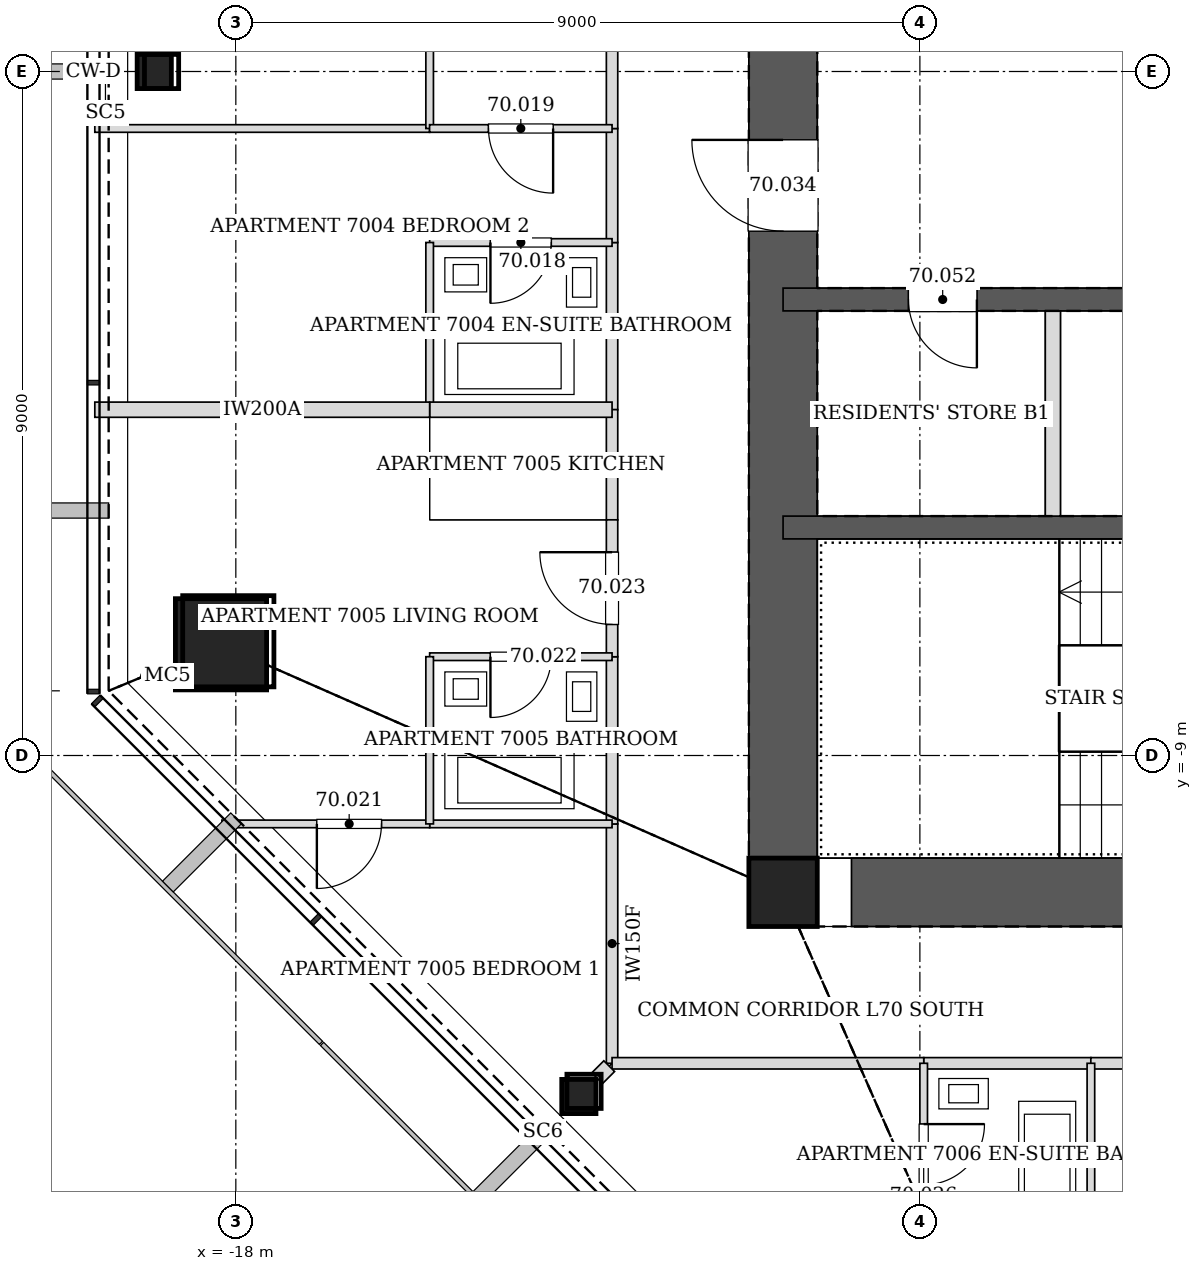
"""IFC4 building model, lengths in metres.
Left out: names, types, materials, properties, quantities, classifications, styles, units other than length and angle.
Written with IfcOpenShell. Run it as: python <this file> out.ifc"""

import sys

from ifc_helpers import new_model, si_unit, direction, frame, frame_2d, origin, origin_2d, place, context, subcontext, project, spatial, rectangle, hollow_rectangle, extrude, element, fill, save


model = new_model("IFC4")
c1 = context("Model", 3, precision=1e-05, world=origin(), true_north=direction((0.0, 1.0)))
c2 = subcontext(c1, "Body", "Model", "MODEL_VIEW")
j1 = project(units=[si_unit("LENGTHUNIT", "METRE"), si_unit("PLANEANGLEUNIT", "RADIAN")], contexts=[c1])
p1 = place(None, origin())
s1 = spatial("IfcSite", under=j1, at=p1, CompositionType="ELEMENT")
p2 = place(p1, origin())
s2 = spatial("IfcBuilding", under=s1, at=p2, CompositionType="ELEMENT")
p3 = place(p2, frame((0.0, 0.0, 287.8)))
s3 = spatial("IfcBuildingStorey", under=s2, at=p3, CompositionType="ELEMENT", Elevation=287.8)
p4 = place(p3, frame((-18.195, -7.537, 0.0), z_axis=(0.02827915051, 0.01169924247, 0.999531598986), x_axis=(-0.382282742426, 0.924045401938, 0.0)))
e1 = element("IfcColumn", 1, at=p4, inside=s3, PredefinedType="COLUMN", context=c2, shape_type="SweptSolid", body=[
    extrude(hollow_rectangle(XDim=1.2, YDim=1.2, WallThickness=0.055, at=origin_2d()), origin(), (0.0, 0.0, 1.0), 3.402),
])
for number, where, z_axis, x_axis in (
    (2, (-19.073, 0.0, 0.0), (0.028, 0.0, 1.0), (0.0, 1.0, 0.0)),
    (3, (-13.487, -13.487, 0.0), (0.02, 0.02, 1.0), (-0.707, 0.707, 0.0)),
):
    element("IfcColumn", number, at=place(p3, frame(where, z_axis=z_axis, x_axis=x_axis)), inside=s3, PredefinedType="COLUMN", context=c2, shape_type="SweptSolid", body=[
        extrude(hollow_rectangle(XDim=0.45, YDim=0.45, WallThickness=0.02, at=origin_2d()), origin(), (0.0, 0.0, 1.0), 3.401),
    ])
p5 = place(p3, frame((-10.8, -10.8, 0.0), z_axis=(0.0, 0.0, 1.0), x_axis=(1.0, 0.0, 0.0)))
e4 = element("IfcColumn", 4, at=p5, inside=s3, PredefinedType="COLUMN", context=c2, shape_type="SweptSolid", body=[
    extrude(hollow_rectangle(XDim=0.9, YDim=0.9, WallThickness=0.04, at=origin_2d()), origin(), (0.0, 0.0, 1.0), 3.4),
])
p6 = place(p3, frame((-10.8, -10.8, 0.0), z_axis=(0.0, 0.0, 1.0), x_axis=(1.0, 0.0, 0.0)))
e5 = element("IfcWall", 5, at=p6, inside=s3, PredefinedType="SOLIDWALL", context=c2, shape_type="SweptSolid", body=[
    extrude(rectangle(XDim=21.6, YDim=0.9, at=frame_2d((10.8, 0.0))), origin(), (0.0, 0.0, 1.0), 3.4),
])
p7 = place(p6, frame((10.05, 0.0, 0.0)))
e6 = element("IfcOpeningElement", 6, at=p7, cuts=e5, PredefinedType="OPENING", context=c2, shape_type="SweptSolid", body=[
    extrude(rectangle(XDim=1.5, YDim=2.1, at=frame_2d((0.75, 1.05))), frame((0.0, 0.46, 0.0), z_axis=(0.0, -1.0, 0.0), x_axis=(1.0, 0.0, 0.0)), (0.0, 0.0, 1.0), 0.92),
])
p8 = place(p6, frame((17.1, 0.0, 0.0)))
e7 = element("IfcOpeningElement", 7, at=p8, cuts=e5, PredefinedType="OPENING", context=c2, shape_type="SweptSolid", body=[
    extrude(rectangle(XDim=0.9, YDim=2.1, at=frame_2d((0.45, 1.05))), frame((0.0, 0.46, 0.0), z_axis=(0.0, -1.0, 0.0), x_axis=(1.0, 0.0, 0.0)), (0.0, 0.0, 1.0), 0.92),
])
p9 = place(p3, frame((-10.8, 10.8, 0.0), z_axis=(0.0, 0.0, 1.0), x_axis=(0.0, -1.0, 0.0)))
e8 = element("IfcWall", 8, at=p9, inside=s3, PredefinedType="SOLIDWALL", context=c2, shape_type="SweptSolid", body=[
    extrude(rectangle(XDim=21.6, YDim=0.9, at=frame_2d((10.8, 0.0))), origin(), (0.0, 0.0, 1.0), 3.4),
])
p10 = place(p9, frame((8.7, 0.0, 0.0)))
e9 = element("IfcOpeningElement", 9, at=p10, cuts=e8, PredefinedType="OPENING", context=c2, shape_type="SweptSolid", body=[
    extrude(rectangle(XDim=1.2, YDim=2.1, at=frame_2d((0.6, 1.05))), frame((0.0, 0.46, 0.0), z_axis=(0.0, -1.0, 0.0), x_axis=(1.0, 0.0, 0.0)), (0.0, 0.0, 1.0), 0.92),
])
p11 = place(p9, frame((11.7, 0.0, 0.0)))
e10 = element("IfcOpeningElement", 10, at=p11, cuts=e8, PredefinedType="OPENING", context=c2, shape_type="SweptSolid", body=[
    extrude(rectangle(XDim=1.2, YDim=2.1, at=frame_2d((0.6, 1.05))), frame((0.0, 0.46, 0.0), z_axis=(0.0, -1.0, 0.0), x_axis=(1.0, 0.0, 0.0)), (0.0, 0.0, 1.0), 0.92),
])
p12 = place(p3, frame((-10.8, -3.0, 0.0), z_axis=(0.0, 0.0, 1.0), x_axis=(1.0, 0.0, 0.0)))
e11 = element("IfcWall", 11, at=p12, inside=s3, PredefinedType="SOLIDWALL", context=c2, shape_type="SweptSolid", body=[
    extrude(rectangle(XDim=21.6, YDim=0.3, at=frame_2d((10.8, 0.0))), origin(), (0.0, 0.0, 1.0), 3.4),
])
p13 = place(p12, frame((4.55, 0.0, 0.0)))
e12 = element("IfcOpeningElement", 12, at=p13, cuts=e11, PredefinedType="OPENING", context=c2, shape_type="SweptSolid", body=[
    extrude(rectangle(XDim=0.9, YDim=2.1, at=frame_2d((0.45, 1.05))), frame((0.0, 0.16, 0.0), z_axis=(0.0, -1.0, 0.0), x_axis=(1.0, 0.0, 0.0)), (0.0, 0.0, 1.0), 0.32),
])
p14 = place(p12, frame((7.45, 0.0, 0.0)))
e13 = element("IfcOpeningElement", 13, at=p14, cuts=e11, PredefinedType="OPENING", context=c2, shape_type="SweptSolid", body=[
    extrude(rectangle(XDim=0.9, YDim=2.1, at=frame_2d((0.45, 1.05))), frame((0.0, 0.16, 0.0), z_axis=(0.0, -1.0, 0.0), x_axis=(1.0, 0.0, 0.0)), (0.0, 0.0, 1.0), 0.32),
])
p15 = place(p12, frame((1.65, 0.0, 0.0)))
e14 = element("IfcOpeningElement", 14, at=p15, cuts=e11, PredefinedType="OPENING", context=c2, shape_type="SweptSolid", body=[
    extrude(rectangle(XDim=0.9, YDim=2.1, at=frame_2d((0.45, 1.05))), frame((0.0, 0.16, 0.0), z_axis=(0.0, -1.0, 0.0), x_axis=(1.0, 0.0, 0.0)), (0.0, 0.0, 1.0), 0.32),
])
p16 = place(p12, frame((13.25, 0.0, 0.0)))
e15 = element("IfcOpeningElement", 15, at=p16, cuts=e11, PredefinedType="OPENING", context=c2, shape_type="SweptSolid", body=[
    extrude(rectangle(XDim=0.9, YDim=2.1, at=frame_2d((0.45, 1.05))), frame((0.0, 0.16, 0.0), z_axis=(0.0, -1.0, 0.0), x_axis=(1.0, 0.0, 0.0)), (0.0, 0.0, 1.0), 0.32),
])
p17 = place(p12, frame((16.05, 0.0, 0.0)))
e16 = element("IfcOpeningElement", 16, at=p17, cuts=e11, PredefinedType="OPENING", context=c2, shape_type="SweptSolid", body=[
    extrude(rectangle(XDim=1.1, YDim=2.1, at=frame_2d((0.55, 1.05))), frame((0.0, 0.16, 0.0), z_axis=(0.0, -1.0, 0.0), x_axis=(1.0, 0.0, 0.0)), (0.0, 0.0, 1.0), 0.32),
])
p18 = place(p12, frame((18.95, 0.0, 0.0)))
e17 = element("IfcOpeningElement", 17, at=p18, cuts=e11, PredefinedType="OPENING", context=c2, shape_type="SweptSolid", body=[
    extrude(rectangle(XDim=1.1, YDim=2.1, at=frame_2d((0.55, 1.05))), frame((0.0, 0.16, 0.0), z_axis=(0.0, -1.0, 0.0), x_axis=(1.0, 0.0, 0.0)), (0.0, 0.0, 1.0), 0.32),
])
p19 = place(p3, frame((-10.8, -6.0, 0.0), z_axis=(0.0, 0.0, 1.0), x_axis=(1.0, 0.0, 0.0)))
e18 = element("IfcWall", 18, at=p19, inside=s3, PredefinedType="SOLIDWALL", context=c2, shape_type="SweptSolid", body=[
    extrude(rectangle(XDim=21.6, YDim=0.3, at=frame_2d((10.8, 0.0))), origin(), (0.0, 0.0, 1.0), 3.4),
])
p20 = place(p19, frame((10.25, 0.0, 0.0)))
e19 = element("IfcOpeningElement", 19, at=p20, cuts=e18, PredefinedType="OPENING", context=c2, shape_type="SweptSolid", body=[
    extrude(rectangle(XDim=1.1, YDim=2.1, at=frame_2d((0.55, 1.05))), frame((0.0, 0.16, 0.0), z_axis=(0.0, -1.0, 0.0), x_axis=(1.0, 0.0, 0.0)), (0.0, 0.0, 1.0), 0.32),
])
p21 = place(p3, frame((-13.05, -2.249, 0.0), z_axis=(0.0, 0.0, 1.0), x_axis=(0.0, -1.0, 0.0)))
e20 = element("IfcWall", 20, at=p21, inside=s3, PredefinedType="PARTITIONING", context=c2, shape_type="SweptSolid", body=[
    extrude(rectangle(XDim=2.202, YDim=0.15, at=frame_2d((1.101, 0.0))), origin(), (0.0, 0.0, 1.0), 3.2),
])
p22 = place(p3, frame((-13.05, -0.749, 0.0), z_axis=(0.0, 0.0, 1.0), x_axis=(0.0, -1.0, 0.0)))
e21 = element("IfcWall", 21, at=p22, inside=s3, PredefinedType="PARTITIONING", context=c2, shape_type="SweptSolid", body=[
    extrude(rectangle(XDim=1.502, YDim=0.15, at=frame_2d((0.751, 0.0))), origin(), (0.0, 0.0, 1.0), 3.2),
])
p23 = place(p3, frame((-13.05, 2.5, 0.0), z_axis=(0.0, 0.0, 1.0), x_axis=(0.0, -1.0, 0.0)))
e22 = element("IfcWall", 22, at=p23, inside=s3, PredefinedType="PARTITIONING", context=c2, shape_type="SweptSolid", body=[
    extrude(rectangle(XDim=3.251, YDim=0.15, at=frame_2d((1.625, 0.0))), origin(), (0.0, 0.0, 1.0), 2.349),
])
p24 = place(p23, frame((1.15, 0.0, 0.0)))
e23 = element("IfcOpeningElement", 23, at=p24, cuts=e22, PredefinedType="OPENING", context=c2, shape_type="SweptSolid", body=[
    extrude(rectangle(XDim=0.95, YDim=2.1, at=frame_2d((0.475, 1.05))), frame((0.0, 0.085, 0.0), z_axis=(0.0, -1.0, 0.0), x_axis=(1.0, 0.0, 0.0)), (0.0, 0.0, 1.0), 0.17),
])
p25 = place(p3, frame((-13.05, -9.899, 0.0), z_axis=(0.0, 0.0, 1.0), x_axis=(0.0, -1.0, 0.0)))
e24 = element("IfcWall", 24, at=p25, inside=s3, PredefinedType="PARTITIONING", context=c2, shape_type="SweptSolid", body=[
    extrude(rectangle(XDim=3.151, YDim=0.15, at=frame_2d((1.576, 0.0))), origin(), (0.0, 0.0, 1.0), 2.497),
])
p26 = place(p3, frame((-13.05, -7.699, 0.0), z_axis=(0.0, 0.0, 1.0), x_axis=(0.0, -1.0, 0.0)))
e25 = element("IfcWall", 25, at=p26, inside=s3, PredefinedType="PARTITIONING", context=c2, shape_type="SweptSolid", body=[
    extrude(rectangle(XDim=2.202, YDim=0.15, at=frame_2d((1.101, 0.0))), origin(), (0.0, 0.0, 1.0), 2.497),
])
p27 = place(p3, frame((-13.05, -4.449, 0.0), z_axis=(0.0, 0.0, 1.0), x_axis=(0.0, -1.0, 0.0)))
e26 = element("IfcWall", 26, at=p27, inside=s3, PredefinedType="PARTITIONING", context=c2, shape_type="SweptSolid", body=[
    extrude(rectangle(XDim=1.452, YDim=0.15, at=frame_2d((0.726, 0.0))), origin(), (0.0, 0.0, 1.0), 3.2),
])
p28 = place(p3, frame((-13.05, -5.899, 0.0), z_axis=(0.0, 0.0, 1.0), x_axis=(0.0, -1.0, 0.0)))
e27 = element("IfcWall", 27, at=p28, inside=s3, PredefinedType="PARTITIONING", context=c2, shape_type="SweptSolid", body=[
    extrude(rectangle(XDim=1.802, YDim=0.15, at=frame_2d((0.901, 0.0))), origin(), (0.0, 0.0, 1.0), 3.2),
])
p29 = place(p28, frame((0.426, 0.0, 0.0)))
e28 = element("IfcOpeningElement", 28, at=p29, cuts=e27, PredefinedType="OPENING", context=c2, shape_type="SweptSolid", body=[
    extrude(rectangle(XDim=0.95, YDim=2.1, at=frame_2d((0.475, 1.05))), frame((0.0, 0.085, 0.0), z_axis=(0.0, -1.0, 0.0), x_axis=(1.0, 0.0, 0.0)), (0.0, 0.0, 1.0), 0.17),
])
p30 = place(p3, frame((-8.951, -13.05, 0.0), z_axis=(0.0, 0.0, 1.0), x_axis=(1.0, 0.0, 0.0)))
e29 = element("IfcWall", 29, at=p30, inside=s3, PredefinedType="PARTITIONING", context=c2, shape_type="SweptSolid", body=[
    extrude(rectangle(XDim=2.202, YDim=0.15, at=frame_2d((1.101, 0.0))), origin(), (0.0, 0.0, 1.0), 3.2),
])
p31 = place(p3, frame((-13.05, -13.05, 0.0), z_axis=(0.0, 0.0, 1.0), x_axis=(1.0, 0.0, 0.0)))
e30 = element("IfcWall", 30, at=p31, inside=s3, PredefinedType="PARTITIONING", context=c2, shape_type="SweptSolid", body=[
    extrude(rectangle(XDim=4.101, YDim=0.15, at=frame_2d((2.051, 0.0))), origin(), (0.0, 0.0, 1.0), 2.497),
])
p32 = place(p3, frame((-6.751, -13.05, 0.0), z_axis=(0.0, 0.0, 1.0), x_axis=(1.0, 0.0, 0.0)))
e31 = element("IfcWall", 31, at=p32, inside=s3, PredefinedType="PARTITIONING", context=c2, shape_type="SweptSolid", body=[
    extrude(rectangle(XDim=9.802, YDim=0.15, at=frame_2d((4.901, 0.0))), origin(), (0.0, 0.0, 1.0), 2.349),
])
p33 = place(p3, frame((-19.855, -0.75, 0.0), z_axis=(0.0, 0.0, 1.0), x_axis=(1.0, 0.0, 0.0)))
e32 = element("IfcWall", 32, at=p33, inside=s3, PredefinedType="PARTITIONING", context=c2, shape_type="SweptSolid", body=[
    extrude(rectangle(XDim=4.405, YDim=0.1, at=frame_2d((2.203, 0.0))), origin(), (0.0, 0.0, 1.0), 2.73),
])
p34 = place(p3, frame((-15.45, -0.75, 0.0), z_axis=(0.0, 0.0, 1.0), x_axis=(0.0, 1.0, 0.0)))
e33 = element("IfcWall", 33, at=p34, inside=s3, PredefinedType="PARTITIONING", context=c2, shape_type="SweptSolid", body=[
    extrude(rectangle(XDim=3.4, YDim=0.1, at=frame_2d((1.7, 0.0))), origin(), (0.0, 0.0, 1.0), 2.349),
])
p35 = place(p3, frame((-13.05, -2.25, 0.0), z_axis=(0.0, 0.0, 1.0), x_axis=(-1.0, 0.0, 0.0)))
e34 = element("IfcWall", 34, at=p35, inside=s3, PredefinedType="PARTITIONING", context=c2, shape_type="SweptSolid", body=[
    extrude(rectangle(XDim=2.4, YDim=0.1, at=frame_2d((1.2, 0.0))), origin(), (0.0, 0.0, 1.0), 2.591),
])
p36 = place(p35, frame((0.8, 0.0, 0.0)))
e35 = element("IfcOpeningElement", 35, at=p36, cuts=e34, PredefinedType="OPENING", context=c2, shape_type="SweptSolid", body=[
    extrude(rectangle(XDim=0.8, YDim=2.1, at=frame_2d((0.4, 1.05))), frame((0.0, 0.06, 0.0), z_axis=(0.0, -1.0, 0.0), x_axis=(1.0, 0.0, 0.0)), (0.0, 0.0, 1.0), 0.12),
])
p37 = place(p3, frame((-15.45, -2.25, 0.0), z_axis=(0.0, 0.0, 1.0), x_axis=(0.0, -1.0, 0.0)))
e36 = element("IfcWall", 36, at=p37, inside=s3, PredefinedType="PARTITIONING", context=c2, shape_type="SweptSolid", body=[
    extrude(rectangle(XDim=2.2, YDim=0.1, at=frame_2d((1.1, 0.0))), origin(), (0.0, 0.0, 1.0), 3.2),
])
p38 = place(p3, frame((-15.45, -4.45, 0.0), z_axis=(0.0, 0.0, 1.0), x_axis=(1.0, 0.0, 0.0)))
e37 = element("IfcWall", 37, at=p38, inside=s3, PredefinedType="PARTITIONING", context=c2, shape_type="SweptSolid", body=[
    extrude(rectangle(XDim=2.4, YDim=0.2, at=frame_2d((1.2, 0.0))), origin(), (0.0, 0.0, 1.0), 2.591),
])
p39 = place(p3, frame((-13.05, -0.75, 0.0), z_axis=(0.0, 0.0, 1.0), x_axis=(-1.0, 0.0, 0.0)))
e38 = element("IfcWall", 38, at=p39, inside=s3, PredefinedType="PARTITIONING", context=c2, shape_type="SweptSolid", body=[
    extrude(rectangle(XDim=2.401, YDim=0.1, at=frame_2d((1.2, 0.0))), origin(), (0.0, 0.0, 1.0), 2.591),
])
p40 = place(p39, frame((0.775, 0.0, 0.0)))
e39 = element("IfcOpeningElement", 39, at=p40, cuts=e38, PredefinedType="OPENING", context=c2, shape_type="SweptSolid", body=[
    extrude(rectangle(XDim=0.85, YDim=2.1, at=frame_2d((0.425, 1.05))), frame((0.0, 0.06, 0.0), z_axis=(0.0, -1.0, 0.0), x_axis=(1.0, 0.0, 0.0)), (0.0, 0.0, 1.0), 0.12),
])
p41 = place(p3, frame((-19.855, -4.45, 0.0), z_axis=(0.0, 0.0, 1.0), x_axis=(1.0, 0.0, 0.0)))
e40 = element("IfcWall", 40, at=p41, inside=s3, PredefinedType="PARTITIONING", context=c2, shape_type="SweptSolid", body=[
    extrude(rectangle(XDim=4.405, YDim=0.2, at=frame_2d((2.203, 0.0))), origin(), (0.0, 0.0, 1.0), 2.73),
])
p42 = place(p3, frame((-13.05, -9.9, 0.0), z_axis=(0.0, 0.0, 1.0), x_axis=(-1.0, 0.0, 0.0)))
e41 = element("IfcWall", 41, at=p42, inside=s3, PredefinedType="PARTITIONING", context=c2, shape_type="SweptSolid", body=[
    extrude(rectangle(XDim=2.401, YDim=0.1, at=frame_2d((1.2, 0.0))), origin(), (0.0, 0.0, 1.0), 2.497),
])
p43 = place(p3, frame((-15.449, -9.9, 0.0), z_axis=(0.0, 0.0, 1.0), x_axis=(-1.0, 0.0, 0.0)))
e42 = element("IfcWall", 42, at=p43, inside=s3, PredefinedType="PARTITIONING", context=c2, shape_type="SweptSolid", body=[
    extrude(rectangle(XDim=2.734, YDim=0.1, at=frame_2d((1.367, 0.0))), origin(), (0.0, 0.0, 1.0), 2.74),
])
p44 = place(p43, frame((0.635, 0.0, 0.0)))
e43 = element("IfcOpeningElement", 43, at=p44, cuts=e42, PredefinedType="OPENING", context=c2, shape_type="SweptSolid", body=[
    extrude(rectangle(XDim=0.85, YDim=2.1, at=frame_2d((0.425, 1.05))), frame((0.0, 0.06, 0.0), z_axis=(0.0, -1.0, 0.0), x_axis=(1.0, 0.0, 0.0)), (0.0, 0.0, 1.0), 0.12),
])
p45 = place(p3, frame((-13.246, -13.246, 0.0), z_axis=(0.0, 0.0, 1.0), x_axis=(0.707106781187, 0.707106781187, 0.0)))
e44 = element("IfcWall", 44, at=p45, inside=s3, PredefinedType="PARTITIONING", context=c2, shape_type="SweptSolid", body=[
    extrude(rectangle(XDim=0.224, YDim=0.2, at=frame_2d((0.112, 0.0))), origin(), (0.0, 0.0, 1.0), 2.591),
])
p46 = place(p3, frame((-13.05, -7.7, 0.0), z_axis=(0.0, 0.0, 1.0), x_axis=(-1.0, 0.0, 0.0)))
e45 = element("IfcWall", 45, at=p46, inside=s3, PredefinedType="PARTITIONING", context=c2, shape_type="SweptSolid", body=[
    extrude(rectangle(XDim=2.4, YDim=0.1, at=frame_2d((1.2, 0.0))), origin(), (0.0, 0.0, 1.0), 2.591),
])
p47 = place(p46, frame((0.8, 0.0, 0.0)))
e46 = element("IfcOpeningElement", 46, at=p47, cuts=e45, PredefinedType="OPENING", context=c2, shape_type="SweptSolid", body=[
    extrude(rectangle(XDim=0.8, YDim=2.1, at=frame_2d((0.4, 1.05))), frame((0.0, 0.06, 0.0), z_axis=(0.0, -1.0, 0.0), x_axis=(1.0, 0.0, 0.0)), (0.0, 0.0, 1.0), 0.12),
])
p48 = place(p3, frame((-15.45, -7.7, 0.0), z_axis=(0.0, 0.0, 1.0), x_axis=(0.0, -1.0, 0.0)))
e47 = element("IfcWall", 47, at=p48, inside=s3, PredefinedType="PARTITIONING", context=c2, shape_type="SweptSolid", body=[
    extrude(rectangle(XDim=2.2, YDim=0.1, at=frame_2d((1.1, 0.0))), origin(), (0.0, 0.0, 1.0), 2.497),
])
p49 = place(p3, frame((-8.95, -13.05, 0.0), z_axis=(0.0, 0.0, 1.0), x_axis=(0.0, -1.0, 0.0)))
e48 = element("IfcWall", 48, at=p49, inside=s3, PredefinedType="PARTITIONING", context=c2, shape_type="SweptSolid", body=[
    extrude(rectangle(XDim=2.4, YDim=0.1, at=frame_2d((1.2, 0.0))), origin(), (0.0, 0.0, 1.0), 2.497),
])
p50 = place(p49, frame((0.8, 0.0, 0.0)))
e49 = element("IfcOpeningElement", 49, at=p50, cuts=e48, PredefinedType="OPENING", context=c2, shape_type="SweptSolid", body=[
    extrude(rectangle(XDim=0.8, YDim=2.1, at=frame_2d((0.4, 1.05))), frame((0.0, 0.06, 0.0), z_axis=(0.0, -1.0, 0.0), x_axis=(1.0, 0.0, 0.0)), (0.0, 0.0, 1.0), 0.12),
])
p51 = place(p3, frame((-6.75, -15.45, 0.0), z_axis=(0.0, 0.0, 1.0), x_axis=(0.0, 1.0, 0.0)))
e50 = element("IfcWall", 50, at=p51, inside=s3, PredefinedType="PARTITIONING", context=c2, shape_type="SweptSolid", body=[
    extrude(rectangle(XDim=2.4, YDim=0.1, at=frame_2d((1.2, 0.0))), origin(), (0.0, 0.0, 1.0), 2.591),
])
p52 = place(p3, frame((-7.25, -5.85, 0.0), z_axis=(0.0, 0.0, 1.0), x_axis=(0.0, 1.0, 0.0)))
e51 = element("IfcWall", 51, at=p52, inside=s3, PredefinedType="PARTITIONING", context=c2, shape_type="SweptSolid", body=[
    extrude(rectangle(XDim=2.7, YDim=0.2, at=frame_2d((1.35, 0.0))), origin(), (0.0, 0.0, 1.0), 3.2),
])
p53 = place(p36, origin())
e52 = element("IfcDoor", 52, at=p53, inside=s3, OperationType="SINGLE_SWING_RIGHT", PredefinedType="DOOR", context=c2, shape_type="SweptSolid", body=[
    extrude(rectangle(XDim=0.8, YDim=2.1, at=frame_2d((0.4, 1.05))), frame((0.0, 0.025, 0.0), z_axis=(0.0, -1.0, 0.0), x_axis=(1.0, 0.0, 0.0)), (0.0, 0.0, 1.0), 0.05),
])
fill(e35, e52)
p54 = place(p40, origin())
e53 = element("IfcDoor", 53, at=p54, inside=s3, OperationType="SINGLE_SWING_LEFT", PredefinedType="DOOR", context=c2, shape_type="SweptSolid", body=[
    extrude(rectangle(XDim=0.85, YDim=2.1, at=frame_2d((0.425, 1.05))), frame((0.0, 0.025, 0.0), z_axis=(0.0, -1.0, 0.0), x_axis=(1.0, 0.0, 0.0)), (0.0, 0.0, 1.0), 0.05),
])
fill(e39, e53)
p55 = place(p44, origin())
e54 = element("IfcDoor", 54, at=p55, inside=s3, OperationType="SINGLE_SWING_RIGHT", PredefinedType="DOOR", context=c2, shape_type="SweptSolid", body=[
    extrude(rectangle(XDim=0.85, YDim=2.1, at=frame_2d((0.425, 1.05))), frame((0.0, 0.025, 0.0), z_axis=(0.0, -1.0, 0.0), x_axis=(1.0, 0.0, 0.0)), (0.0, 0.0, 1.0), 0.05),
])
fill(e43, e54)
p56 = place(p47, origin())
e55 = element("IfcDoor", 55, at=p56, inside=s3, OperationType="SINGLE_SWING_RIGHT", PredefinedType="DOOR", context=c2, shape_type="SweptSolid", body=[
    extrude(rectangle(XDim=0.8, YDim=2.1, at=frame_2d((0.4, 1.05))), frame((0.0, 0.025, 0.0), z_axis=(0.0, -1.0, 0.0), x_axis=(1.0, 0.0, 0.0)), (0.0, 0.0, 1.0), 0.05),
])
fill(e46, e55)
p57 = place(p29, frame((0.95, 0.0, 0.0), z_axis=(0.0, 0.0, 1.0), x_axis=(-1.0, 0.0, 0.0)))
e56 = element("IfcDoor", 56, at=p57, inside=s3, OperationType="SINGLE_SWING_RIGHT", PredefinedType="DOOR", context=c2, shape_type="SweptSolid", body=[
    extrude(rectangle(XDim=0.95, YDim=2.1, at=frame_2d((0.475, 1.05))), frame((0.0, 0.025, 0.0), z_axis=(0.0, -1.0, 0.0), x_axis=(1.0, 0.0, 0.0)), (0.0, 0.0, 1.0), 0.05),
])
fill(e28, e56)
p58 = place(p50, origin())
e57 = element("IfcDoor", 57, at=p58, inside=s3, OperationType="SINGLE_SWING_LEFT", PredefinedType="DOOR", context=c2, shape_type="SweptSolid", body=[
    extrude(rectangle(XDim=0.8, YDim=2.1, at=frame_2d((0.4, 1.05))), frame((0.0, 0.025, 0.0), z_axis=(0.0, -1.0, 0.0), x_axis=(1.0, 0.0, 0.0)), (0.0, 0.0, 1.0), 0.05),
])
fill(e49, e57)
p59 = place(p11, frame((1.2, 0.0, 0.0), z_axis=(0.0, 0.0, 1.0), x_axis=(-1.0, 0.0, 0.0)))
e58 = element("IfcDoor", 58, at=p59, inside=s3, OperationType="SINGLE_SWING_RIGHT", PredefinedType="DOOR", context=c2, shape_type="SweptSolid", body=[
    extrude(rectangle(XDim=1.2, YDim=2.1, at=frame_2d((0.6, 1.05))), frame((0.0, 0.025, 0.0), z_axis=(0.0, -1.0, 0.0), x_axis=(1.0, 0.0, 0.0)), (0.0, 0.0, 1.0), 0.05),
])
fill(e10, e58)
p60 = place(p15, frame((0.9, 0.0, 0.0), z_axis=(0.0, 0.0, 1.0), x_axis=(-1.0, 0.0, 0.0)))
e59 = element("IfcDoor", 59, at=p60, inside=s3, OperationType="SINGLE_SWING_LEFT", PredefinedType="DOOR", context=c2, shape_type="SweptSolid", body=[
    extrude(rectangle(XDim=0.9, YDim=2.1, at=frame_2d((0.45, 1.05))), frame((0.0, 0.025, 0.0), z_axis=(0.0, -1.0, 0.0), x_axis=(1.0, 0.0, 0.0)), (0.0, 0.0, 1.0), 0.05),
])
fill(e14, e59)
save(model, sys.argv[1])
